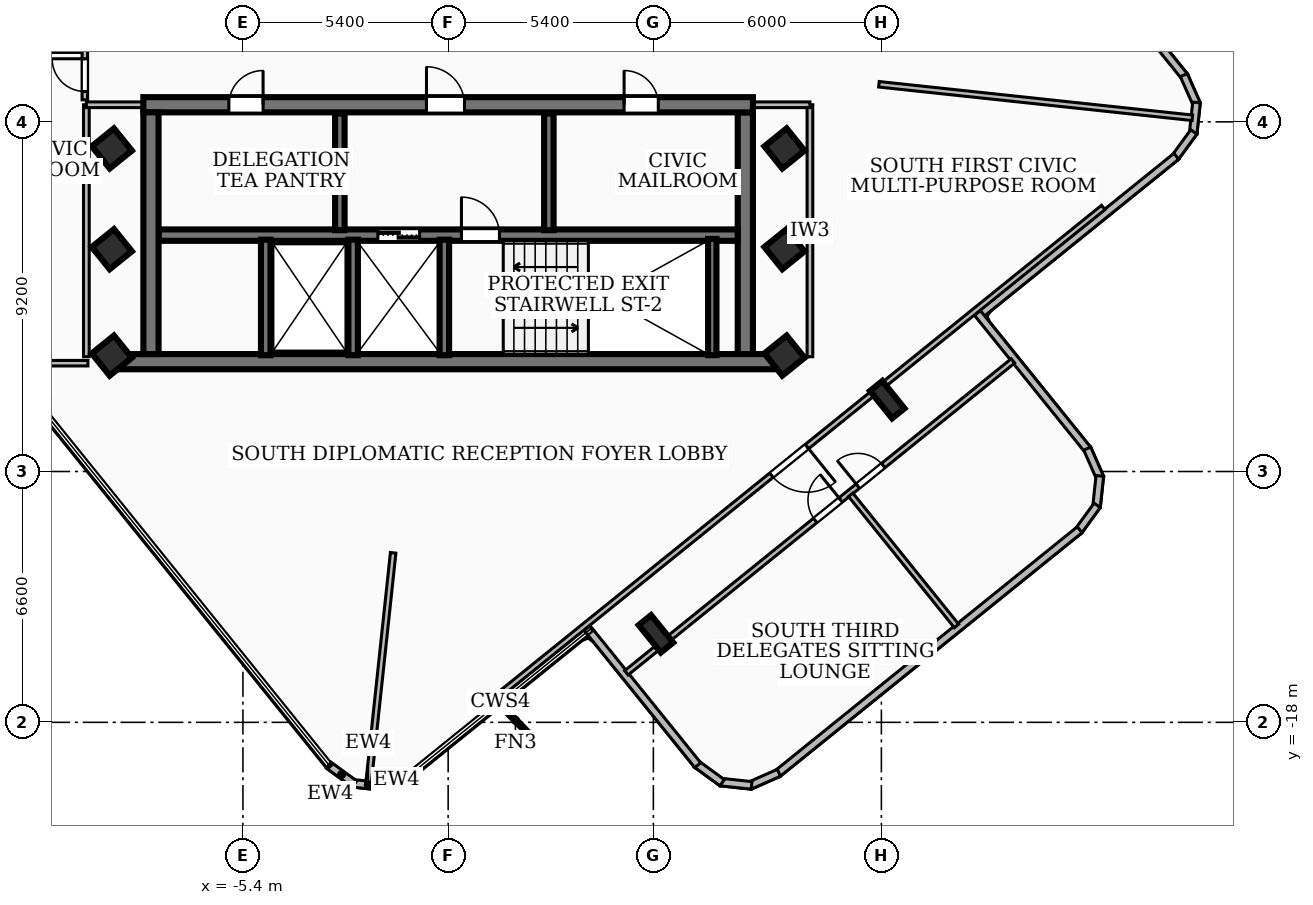
"""IFC4 building model, lengths in metres.
Left out: names, types, materials, properties, quantities, classifications, styles, units other than length and angle.
Written with IfcOpenShell. Run it as: python <this file> out.ifc"""

import sys

from ifc_helpers import new_model, si_unit, direction, frame, frame_2d, origin, origin_2d, place, context, subcontext, project, spatial, rectangle, i_section, extrude, element, fill, save


model = new_model("IFC4")
c1 = context("Model", 3, precision=1e-05, world=origin(), true_north=direction((0.0, 1.0)))
c2 = subcontext(c1, "Body", "Model", "MODEL_VIEW")
j1 = project(units=[si_unit("LENGTHUNIT", "METRE"), si_unit("PLANEANGLEUNIT", "RADIAN")], contexts=[c1])
p1 = place(None, origin())
s1 = spatial("IfcSite", under=j1, at=p1, CompositionType="ELEMENT")
p2 = place(p1, origin())
s2 = spatial("IfcBuilding", under=s1, at=p2, CompositionType="ELEMENT")
p3 = place(p2, frame((0.0, 0.0, 235.98)))
s3 = spatial("IfcBuildingStorey", under=s2, at=p3, CompositionType="ELEMENT", Elevation=235.98)
p4 = place(p3, frame((8.78, -8.51, 0.0), z_axis=(0.0, 0.0, 1.0), x_axis=(-1.0, 0.0, 0.0)))
e1 = element("IfcWall", 1, at=p4, inside=s3, PredefinedType="SHEAR", context=c2, shape_type="SweptSolid", body=[
    extrude(rectangle(XDim=17.56, YDim=0.4, at=frame_2d((8.78, 0.0))), origin(), (0.0, 0.0, 1.0), 3.02),
])
p5 = place(p3, frame((-8.02, -1.75, 0.0), z_axis=(0.0, 0.0, 1.0), x_axis=(1.0, 0.0, 0.0)))
e2 = element("IfcWall", 2, at=p5, inside=s3, PredefinedType="SHEAR", context=c2, shape_type="SweptSolid", body=[
    extrude(rectangle(XDim=16.04, YDim=0.4, at=frame_2d((8.02, 0.0))), origin(), (0.0, 0.0, 1.0), 3.02),
])
p6 = place(p5, frame((7.45, 0.0, 0.0)))
e3 = element("IfcOpeningElement", 3, at=p6, cuts=e2, PredefinedType="OPENING", context=c2, shape_type="SweptSolid", body=[
    extrude(rectangle(XDim=1.0, YDim=2.1, at=frame_2d((0.5, 1.05))), frame((0.0, 0.21, 0.0), z_axis=(0.0, -1.0, 0.0), x_axis=(1.0, 0.0, 0.0)), (0.0, 0.0, 1.0), 0.42),
])
p7 = place(p5, frame((12.65, 0.0, 0.0)))
e4 = element("IfcOpeningElement", 4, at=p7, cuts=e2, PredefinedType="OPENING", context=c2, shape_type="SweptSolid", body=[
    extrude(rectangle(XDim=0.9, YDim=2.06, at=frame_2d((0.45, 1.03))), frame((0.0, 0.21, 0.0), z_axis=(0.0, -1.0, 0.0), x_axis=(1.0, 0.0, 0.0)), (0.0, 0.0, 1.0), 0.42),
])
p8 = place(p5, frame((2.25, 0.0, 0.0)))
e5 = element("IfcOpeningElement", 5, at=p8, cuts=e2, PredefinedType="OPENING", context=c2, shape_type="SweptSolid", body=[
    extrude(rectangle(XDim=0.9, YDim=2.06, at=frame_2d((0.45, 1.03))), frame((0.0, 0.21, 0.0), z_axis=(0.0, -1.0, 0.0), x_axis=(1.0, 0.0, 0.0)), (0.0, 0.0, 1.0), 0.42),
])
for number, where, z_axis, x_axis in (
    (6, (-7.82, -8.31, 0.0), (0.0, 0.0, 1.0), (0.0, 1.0, 0.0)),
    (7, (7.82, -1.95, 0.0), (0.0, 0.0, 1.0), (0.0, -1.0, 0.0)),
):
    element("IfcWall", number, at=place(p3, frame(where, z_axis=z_axis, x_axis=x_axis)), inside=s3, PredefinedType="SHEAR", context=c2, shape_type="SweptSolid", body=[
        extrude(rectangle(XDim=6.36, YDim=0.4, at=frame_2d((3.18, 0.0))), origin(), (0.0, 0.0, 1.0), 3.02),
    ])
p9 = place(p3, frame((-7.62, -5.18, 0.0), z_axis=(0.0, 0.0, 1.0), x_axis=(1.0, 0.0, 0.0)))
e8 = element("IfcWall", 8, at=p9, inside=s3, PredefinedType="SOLIDWALL", context=c2, shape_type="SweptSolid", body=[
    extrude(rectangle(XDim=15.24, YDim=0.3, at=frame_2d((7.62, 0.0))), origin(), (0.0, 0.0, 1.0), 3.02),
])
p10 = place(p9, frame((5.77, 0.0, 0.0)))
e9 = element("IfcOpeningElement", 9, at=p10, cuts=e8, PredefinedType="OPENING", context=c2, shape_type="SweptSolid", body=[
    extrude(rectangle(XDim=1.1, YDim=2.15, at=frame_2d((0.55, 1.075))), frame((0.0, 0.16, 0.0), z_axis=(0.0, -1.0, 0.0), x_axis=(1.0, 0.0, 0.0)), (0.0, 0.0, 1.0), 0.32),
])
p11 = place(p9, frame((7.97, 0.0, 0.0)))
e10 = element("IfcOpeningElement", 10, at=p11, cuts=e8, PredefinedType="OPENING", context=c2, shape_type="SweptSolid", body=[
    extrude(rectangle(XDim=1.0, YDim=2.1, at=frame_2d((0.5, 1.05))), frame((0.0, 0.16, 0.0), z_axis=(0.0, -1.0, 0.0), x_axis=(1.0, 0.0, 0.0)), (0.0, 0.0, 1.0), 0.32),
])
p12 = place(p3, frame((6.95, -8.34, 0.0), z_axis=(0.0, 0.0, 1.0), x_axis=(0.0, 1.0, 0.0)))
e11 = element("IfcWall", 11, at=p12, inside=s3, PredefinedType="SOLIDWALL", context=c2, shape_type="SweptSolid", body=[
    extrude(rectangle(XDim=3.06, YDim=0.22, at=frame_2d((1.53, 0.0))), origin(), (0.0, 0.0, 1.0), 3.02),
])
for number, where, z_axis, x_axis in (
    (12, (-0.1, -8.34, 0.0), (0.0, 0.0, 1.0), (0.0, 1.0, 0.0)),
    (13, (-2.5, -8.34, 0.0), (0.0, 0.0, 1.0), (0.0, 1.0, 0.0)),
    (14, (-4.8, -8.34, 0.0), (0.0, 0.0, 1.0), (0.0, 1.0, 0.0)),
):
    element("IfcWall", number, at=place(p3, frame(where, z_axis=z_axis, x_axis=x_axis)), inside=s3, PredefinedType="SOLIDWALL", context=c2, shape_type="SweptSolid", body=[
        extrude(rectangle(XDim=3.04, YDim=0.25, at=frame_2d((1.52, 0.0))), origin(), (0.0, 0.0, 1.0), 3.02),
    ])
for number, where, z_axis, x_axis in (
    (15, (-2.85, -5.05, 0.0), (0.0, 0.0, 1.0), (0.0, 1.0, 0.0)),
    (16, (2.65, -5.05, 0.0), (0.0, 0.0, 1.0), (0.0, 1.0, 0.0)),
):
    element("IfcWall", number, at=place(p3, frame(where, z_axis=z_axis, x_axis=x_axis)), inside=s3, PredefinedType="SOLIDWALL", context=c2, shape_type="SweptSolid", body=[
        extrude(rectangle(XDim=3.07, YDim=0.25, at=frame_2d((1.535, 0.0))), origin(), (0.0, 0.0, 1.0), 3.02),
    ])
for number, where, z_axis, x_axis in (
    (17, (-8.85, -5.55, 0.0), (0.0, 0.0, 1.0), (0.778, 0.628, 0.0)),
    (18, (-8.85, -2.9, 0.0), (0.0, 0.0, 1.0), (0.778, 0.628, 0.0)),
    (19, (8.85, -5.55, 0.0), (0.0, 0.0, 1.0), (0.778, 0.628, 0.0)),
    (20, (8.85, -2.9, 0.0), (0.0, 0.0, 1.0), (0.778, 0.628, 0.0)),
    (21, (8.85, -8.35, 0.0), (0.0, 0.0, 1.0), (0.778, 0.628, 0.0)),
    (22, (-8.85, -8.35, 0.0), (0.0, 0.0, 1.0), (0.778, 0.628, 0.0)),
):
    element("IfcColumn", number, at=place(p3, frame(where, z_axis=z_axis, x_axis=x_axis)), inside=s3, PredefinedType="COLUMN", context=c2, shape_type="SweptSolid", body=[
        extrude(rectangle(XDim=0.75, YDim=0.75, at=origin_2d()), origin(), (0.0, 0.0, 1.0), 3.42),
    ])
for number, where, z_axis, x_axis in (
    (23, (5.468, -15.671, 0.0), (0.0, 0.0, 1.0), (0.778, 0.628, 0.0)),
    (24, (11.554, -9.51, 0.0), (0.0, 0.0, 1.0), (0.778, 0.628, 0.0)),
):
    element("IfcColumn", number, at=place(p3, frame(where, z_axis=z_axis, x_axis=x_axis)), inside=s3, PredefinedType="COLUMN", context=c2, shape_type="SweptSolid", body=[
        extrude(i_section(OverallWidth=0.418, OverallDepth=0.927, WebThickness=0.019, FlangeThickness=0.032, at=origin_2d()), origin(), (0.0, 0.0, 1.0), 3.42),
    ])
p13 = place(p3, frame((-0.971, -19.359, 0.0), z_axis=(0.0, 0.0, 1.0), x_axis=(-0.914183108905, -0.405301422885, 0.0)))
e25 = element("IfcWall", 25, at=p13, inside=s3, PredefinedType="SOLIDWALL", context=c2, shape_type="SweptSolid", body=[
    extrude(rectangle(XDim=0.839, YDim=0.2, at=frame_2d((0.419, 0.0))), origin(), (0.0, 0.0, 1.0), 3.02),
])
p14 = place(p3, frame((-1.69, -19.692, 0.0), z_axis=(0.0, 0.0, 1.0), x_axis=(-0.994305793889, 0.10656447925, 0.0)))
e26 = element("IfcWall", 26, at=p14, inside=s3, PredefinedType="SOLIDWALL", context=c2, shape_type="SweptSolid", body=[
    extrude(rectangle(XDim=0.825, YDim=0.2, at=frame_2d((0.412, 0.0))), origin(), (0.0, 0.0, 1.0), 3.02),
])
p15 = place(p3, frame((-2.465, -19.622, 0.0), z_axis=(0.0, 0.0, 1.0), x_axis=(-0.807172403894, 0.590315771763, 0.0)))
e27 = element("IfcWall", 27, at=p15, inside=s3, PredefinedType="SOLIDWALL", context=c2, shape_type="SweptSolid", body=[
    extrude(rectangle(XDim=0.839, YDim=0.2, at=frame_2d((0.419, 0.0))), origin(), (0.0, 0.0, 1.0), 3.02),
])
p16 = place(p3, frame((15.528, 3.766, 0.0), z_axis=(0.0, 0.0, 1.0), x_axis=(0.62803447323, -0.778185518007, 0.0)))
e28 = element("IfcWall", 28, at=p16, inside=s3, PredefinedType="SOLIDWALL", context=c2, shape_type="SweptSolid", body=[
    extrude(rectangle(XDim=6.141, YDim=0.2, at=frame_2d((3.071, 0.0))), origin(), (0.0, 0.0, 1.0), 3.02),
])
p17 = place(p3, frame((19.359, -0.971, 0.0), z_axis=(0.0, 0.0, 1.0), x_axis=(0.405301422885, -0.914183108905, 0.0)))
e29 = element("IfcWall", 29, at=p17, inside=s3, PredefinedType="SOLIDWALL", context=c2, shape_type="SweptSolid", body=[
    extrude(rectangle(XDim=0.839, YDim=0.2, at=frame_2d((0.419, 0.0))), origin(), (0.0, 0.0, 1.0), 3.02),
])
p18 = place(p3, frame((19.692, -1.69, 0.0), z_axis=(0.0, 0.0, 1.0), x_axis=(-0.10656447925, -0.994305793889, 0.0)))
e30 = element("IfcWall", 30, at=p18, inside=s3, PredefinedType="SOLIDWALL", context=c2, shape_type="SweptSolid", body=[
    extrude(rectangle(XDim=0.825, YDim=0.2, at=frame_2d((0.412, 0.0))), origin(), (0.0, 0.0, 1.0), 3.02),
])
p19 = place(p3, frame((19.622, -2.465, 0.0), z_axis=(0.0, 0.0, 1.0), x_axis=(-0.590315771763, -0.807172403894, 0.0)))
e31 = element("IfcWall", 31, at=p19, inside=s3, PredefinedType="SOLIDWALL", context=c2, shape_type="SweptSolid", body=[
    extrude(rectangle(XDim=0.839, YDim=0.2, at=frame_2d((0.419, 0.0))), origin(), (0.0, 0.0, 1.0), 3.02),
])
p20 = place(p3, frame((19.161, -3.106, 0.0), z_axis=(0.0, 0.0, 1.0), x_axis=(-0.778151520732, -0.62807659627, 0.0)))
e32 = element("IfcWall", 32, at=p20, inside=s3, PredefinedType="SOLIDWALL", context=c2, shape_type="SweptSolid", body=[
    extrude(rectangle(XDim=6.741, YDim=0.2, at=frame_2d((3.371, 0.0))), origin(), (0.0, 0.0, 1.0), 3.02),
])
p21 = place(p3, frame((13.927, -7.228, 0.0), z_axis=(0.0, 0.0, 1.0), x_axis=(0.628127692416, -0.778110276259, 0.0)))
e33 = element("IfcWall", 33, at=p21, inside=s3, PredefinedType="SOLIDWALL", context=c2, shape_type="SweptSolid", body=[
    extrude(rectangle(XDim=4.641, YDim=0.2, at=frame_2d((2.32, 0.0))), origin(), (0.0, 0.0, 1.0), 3.02),
])
p22 = place(p3, frame((16.816, -10.797, 0.0), z_axis=(0.0, 0.0, 1.0), x_axis=(0.404435765222, -0.914566406451, 0.0)))
e34 = element("IfcWall", 34, at=p22, inside=s3, PredefinedType="SOLIDWALL", context=c2, shape_type="SweptSolid", body=[
    extrude(rectangle(XDim=0.838, YDim=0.2, at=frame_2d((0.419, 0.0))), origin(), (0.0, 0.0, 1.0), 3.02),
])
p23 = place(p3, frame((17.148, -11.516, 0.0), z_axis=(0.0, 0.0, 1.0), x_axis=(-0.106595853222, -0.994302430891, 0.0)))
e35 = element("IfcWall", 35, at=p23, inside=s3, PredefinedType="SOLIDWALL", context=c2, shape_type="SweptSolid", body=[
    extrude(rectangle(XDim=0.824, YDim=0.2, at=frame_2d((0.412, 0.0))), origin(), (0.0, 0.0, 1.0), 3.02),
])
p24 = place(p3, frame((17.078, -12.291, 0.0), z_axis=(0.0, 0.0, 1.0), x_axis=(-0.589366307287, -0.807865926893, 0.0)))
e36 = element("IfcWall", 36, at=p24, inside=s3, PredefinedType="SOLIDWALL", context=c2, shape_type="SweptSolid", body=[
    extrude(rectangle(XDim=0.838, YDim=0.2, at=frame_2d((0.419, 0.0))), origin(), (0.0, 0.0, 1.0), 3.02),
])
p25 = place(p3, frame((16.618, -12.932, 0.0), z_axis=(0.0, 0.0, 1.0), x_axis=(-0.778166052264, -0.628058592095, 0.0)))
e37 = element("IfcWall", 37, at=p25, inside=s3, PredefinedType="SOLIDWALL", context=c2, shape_type="SweptSolid", body=[
    extrude(rectangle(XDim=10.224, YDim=0.2, at=frame_2d((5.112, 0.0))), origin(), (0.0, 0.0, 1.0), 3.02),
])
p26 = place(p3, frame((8.704, -19.327, 0.0), z_axis=(0.0, 0.0, 1.0), x_axis=(-0.914614013687, -0.404328091983, 0.0)))
e38 = element("IfcWall", 38, at=p26, inside=s3, PredefinedType="SOLIDWALL", context=c2, shape_type="SweptSolid", body=[
    extrude(rectangle(XDim=0.839, YDim=0.2, at=frame_2d((0.419, 0.0))), origin(), (0.0, 0.0, 1.0), 3.02),
])
p27 = place(p3, frame((7.985, -19.659, 0.0), z_axis=(0.0, 0.0, 1.0), x_axis=(-0.994305793889, 0.10656447925, 0.0)))
e39 = element("IfcWall", 39, at=p27, inside=s3, PredefinedType="SOLIDWALL", context=c2, shape_type="SweptSolid", body=[
    extrude(rectangle(XDim=0.825, YDim=0.2, at=frame_2d((0.412, 0.0))), origin(), (0.0, 0.0, 1.0), 3.02),
])
p28 = place(p3, frame((7.21, -19.589, 0.0), z_axis=(0.0, 0.0, 1.0), x_axis=(-0.807172403894, 0.590315771763, 0.0)))
e40 = element("IfcWall", 40, at=p28, inside=s3, PredefinedType="SOLIDWALL", context=c2, shape_type="SweptSolid", body=[
    extrude(rectangle(XDim=0.839, YDim=0.2, at=frame_2d((0.419, 0.0))), origin(), (0.0, 0.0, 1.0), 3.02),
])
p29 = place(p3, frame((6.569, -19.128, 0.0), z_axis=(0.0, 0.0, 1.0), x_axis=(-0.628050563363, 0.778172532193, 0.0)))
e41 = element("IfcWall", 41, at=p29, inside=s3, PredefinedType="SOLIDWALL", context=c2, shape_type="SweptSolid", body=[
    extrude(rectangle(XDim=4.641, YDim=0.2, at=frame_2d((2.321, 0.0))), origin(), (0.0, 0.0, 1.0), 3.02),
])
p30 = place(p3, frame((-9.52, -8.38, 0.0), z_axis=(0.0, 0.0, 1.0), x_axis=(0.0, 1.0, 0.0)))
e42 = element("IfcWall", 42, at=p30, inside=s3, PredefinedType="PARTITIONING", context=c2, shape_type="SweptSolid", body=[
    extrude(rectangle(XDim=6.63, YDim=0.15, at=frame_2d((3.315, 0.0))), origin(), (0.0, 0.0, 1.0), 1.904),
])
p31 = place(p3, frame((-7.85, -1.75, 0.0), z_axis=(0.0, 0.0, 1.0), x_axis=(-1.0, 0.0, 0.0)))
e43 = element("IfcWall", 43, at=p31, inside=s3, PredefinedType="PARTITIONING", context=c2, shape_type="SweptSolid", body=[
    extrude(rectangle(XDim=1.67, YDim=0.15, at=frame_2d((0.835, 0.0))), origin(), (0.0, 0.0, 1.0), 1.15),
])
p32 = place(p3, frame((9.52, -8.38, 0.0), z_axis=(0.0, 0.0, 1.0), x_axis=(0.0, 1.0, 0.0)))
e44 = element("IfcWall", 44, at=p32, inside=s3, PredefinedType="PARTITIONING", context=c2, shape_type="SweptSolid", body=[
    extrude(rectangle(XDim=6.63, YDim=0.15, at=frame_2d((3.315, 0.0))), origin(), (0.0, 0.0, 1.0), 3.02),
])
p33 = place(p3, frame((7.85, -1.75, 0.0), z_axis=(0.0, 0.0, 1.0), x_axis=(1.0, 0.0, 0.0)))
e45 = element("IfcWall", 45, at=p33, inside=s3, PredefinedType="PARTITIONING", context=c2, shape_type="SweptSolid", body=[
    extrude(rectangle(XDim=1.67, YDim=0.15, at=frame_2d((0.835, 0.0))), origin(), (0.0, 0.0, 1.0), 2.25),
])
p34 = place(p3, frame((-18.242, -0.3, 0.0), z_axis=(0.0, 0.0, 1.0), x_axis=(1.0, 0.0, 0.0)))
e46 = element("IfcWall", 46, at=p34, inside=s3, PredefinedType="PARTITIONING", context=c2, shape_type="SweptSolid", body=[
    extrude(rectangle(XDim=8.582, YDim=0.145, at=frame_2d((4.291, 0.0))), origin(), (0.0, 0.0, 1.0), 1.15),
])
p35 = place(p3, frame((-11.585, -8.55, 0.0), z_axis=(0.0, 0.0, 1.0), x_axis=(1.0, 0.0, 0.0)))
e47 = element("IfcWall", 47, at=p35, inside=s3, PredefinedType="PARTITIONING", context=c2, shape_type="SweptSolid", body=[
    extrude(rectangle(XDim=2.105, YDim=0.145, at=frame_2d((1.052, 0.0))), origin(), (0.0, 0.0, 1.0), 3.02),
])
p36 = place(p3, frame((-9.56, -1.62, 0.0), z_axis=(0.0, 0.0, 1.0), x_axis=(0.0, 1.0, 0.0)))
e48 = element("IfcWall", 48, at=p36, inside=s3, PredefinedType="PARTITIONING", context=c2, shape_type="SweptSolid", body=[
    extrude(rectangle(XDim=3.24, YDim=0.145, at=frame_2d((1.62, 0.0))), origin(), (0.0, 0.0, 1.0), 3.02),
])
p37 = place(p36, frame((0.22, 0.0, 0.0)))
e49 = element("IfcOpeningElement", 49, at=p37, cuts=e48, PredefinedType="OPENING", context=c2, shape_type="SweptSolid", body=[
    extrude(rectangle(XDim=0.86, YDim=2.04, at=frame_2d((0.43, 1.02))), frame((0.0, 0.083, 0.0), z_axis=(0.0, -1.0, 0.0), x_axis=(1.0, 0.0, 0.0)), (0.0, 0.0, 1.0), 0.165),
])
p38 = place(p36, frame((2.16, 0.0, 0.0)))
e50 = element("IfcOpeningElement", 50, at=p38, cuts=e48, PredefinedType="OPENING", context=c2, shape_type="SweptSolid", body=[
    extrude(rectangle(XDim=0.86, YDim=2.04, at=frame_2d((0.43, 1.02))), frame((0.0, 0.083, 0.0), z_axis=(0.0, -1.0, 0.0), x_axis=(1.0, 0.0, 0.0)), (0.0, 0.0, 1.0), 0.165),
])
p39 = place(p3, frame((-1.447, -13.54, 0.0), z_axis=(0.0, 0.0, 1.0), x_axis=(-0.106294824765, -0.994334657059, 0.0)))
e51 = element("IfcWall", 51, at=p39, inside=s3, PredefinedType="PARTITIONING", context=c2, shape_type="SweptSolid", body=[
    extrude(rectangle(XDim=6.077, YDim=0.145, at=frame_2d((3.039, 0.0))), origin(), (0.0, 0.0, 1.0), 3.02),
])
p40 = place(p3, frame((11.335, -1.211, 0.0), z_axis=(0.0, 0.0, 1.0), x_axis=(0.994330067434, -0.106337749634, 0.0)))
e52 = element("IfcWall", 52, at=p40, inside=s3, PredefinedType="PARTITIONING", context=c2, shape_type="SweptSolid", body=[
    extrude(rectangle(XDim=8.295, YDim=0.145, at=frame_2d((4.147, 0.0))), origin(), (0.0, 0.0, 1.0), 3.02),
])
p41 = place(p3, frame((17.239, -4.452, 0.0), z_axis=(0.0, 0.0, 1.0), x_axis=(-0.778262183237, -0.627939466942, 0.0)))
e53 = element("IfcWall", 53, at=p41, inside=s3, PredefinedType="PARTITIONING", context=c2, shape_type="SweptSolid", body=[
    extrude(rectangle(XDim=20.641, YDim=0.145, at=frame_2d((10.32, 0.0))), origin(), (0.0, 0.0, 1.0), 2.39),
])
p42 = place(p41, frame((10.02, 0.0, 0.0)))
e54 = element("IfcOpeningElement", 54, at=p42, cuts=e53, PredefinedType="OPENING", context=c2, shape_type="SweptSolid", body=[
    extrude(rectangle(XDim=1.2, YDim=2.1, at=frame_2d((0.6, 1.05))), frame((0.0, 0.083, 0.0), z_axis=(0.0, -1.0, 0.0), x_axis=(1.0, 0.0, 0.0)), (0.0, 0.0, 1.0), 0.165),
])
p43 = place(p3, frame((10.592, -12.012, 0.0), z_axis=(0.0, 0.0, 1.0), x_axis=(0.627878320572, -0.778311515112, 0.0)))
e55 = element("IfcWall", 55, at=p43, inside=s3, PredefinedType="PARTITIONING", context=c2, shape_type="SweptSolid", body=[
    extrude(rectangle(XDim=4.436, YDim=0.145, at=frame_2d((2.218, 0.0))), origin(), (0.0, 0.0, 1.0), 3.02),
])
p44 = place(p3, frame((4.69, -16.697, 0.0), z_axis=(0.0, 0.0, 1.0), x_axis=(0.778274338812, 0.62792440114, 0.0)))
e56 = element("IfcWall", 56, at=p44, inside=s3, PredefinedType="PARTITIONING", context=c2, shape_type="SweptSolid", body=[
    extrude(rectangle(XDim=13.07, YDim=0.145, at=frame_2d((6.535, 0.0))), origin(), (0.0, 0.0, 1.0), 3.02),
])
p45 = place(p44, frame((6.385, 0.0, 0.0)))
e57 = element("IfcOpeningElement", 57, at=p45, cuts=e56, PredefinedType="OPENING", context=c2, shape_type="SweptSolid", body=[
    extrude(rectangle(XDim=0.86, YDim=2.04, at=frame_2d((0.43, 1.02))), frame((0.0, 0.083, 0.0), z_axis=(0.0, -1.0, 0.0), x_axis=(1.0, 0.0, 0.0)), (0.0, 0.0, 1.0), 0.165),
])
p46 = place(p44, frame((7.825, 0.0, 0.0)))
e58 = element("IfcOpeningElement", 58, at=p46, cuts=e56, PredefinedType="OPENING", context=c2, shape_type="SweptSolid", body=[
    extrude(rectangle(XDim=0.86, YDim=2.04, at=frame_2d((0.43, 1.02))), frame((0.0, 0.083, 0.0), z_axis=(0.0, -1.0, 0.0), x_axis=(1.0, 0.0, 0.0)), (0.0, 0.0, 1.0), 0.165),
])
p47 = place(p6, origin())
e59 = element("IfcDoor", 59, at=p47, inside=s3, OperationType="SINGLE_SWING_LEFT", PredefinedType="DOOR", context=c2, shape_type="SweptSolid", body=[
    extrude(rectangle(XDim=1.0, YDim=2.1, at=frame_2d((0.5, 1.05))), frame((0.0, 0.025, 0.0), z_axis=(0.0, -1.0, 0.0), x_axis=(1.0, 0.0, 0.0)), (0.0, 0.0, 1.0), 0.05),
])
fill(e3, e59)
p48 = place(p10, origin())
e60 = element("IfcDoor", 60, at=p48, inside=s3, OperationType="DOUBLE_DOOR_SLIDING", PredefinedType="DOOR", context=c2, shape_type="SweptSolid", body=[
    extrude(rectangle(XDim=1.1, YDim=2.15, at=frame_2d((0.55, 1.075))), frame((0.0, 0.025, 0.0), z_axis=(0.0, -1.0, 0.0), x_axis=(1.0, 0.0, 0.0)), (0.0, 0.0, 1.0), 0.05),
])
fill(e9, e60)
p49 = place(p11, origin())
e61 = element("IfcDoor", 61, at=p49, inside=s3, OperationType="SINGLE_SWING_LEFT", PredefinedType="DOOR", context=c2, shape_type="SweptSolid", body=[
    extrude(rectangle(XDim=1.0, YDim=2.1, at=frame_2d((0.5, 1.05))), frame((0.0, 0.025, 0.0), z_axis=(0.0, -1.0, 0.0), x_axis=(1.0, 0.0, 0.0)), (0.0, 0.0, 1.0), 0.05),
])
fill(e10, e61)
p50 = place(p7, origin())
e62 = element("IfcDoor", 62, at=p50, inside=s3, OperationType="SINGLE_SWING_LEFT", PredefinedType="DOOR", context=c2, shape_type="SweptSolid", body=[
    extrude(rectangle(XDim=0.9, YDim=2.06, at=frame_2d((0.45, 1.03))), frame((0.0, 0.025, 0.0), z_axis=(0.0, -1.0, 0.0), x_axis=(1.0, 0.0, 0.0)), (0.0, 0.0, 1.0), 0.05),
])
fill(e4, e62)
p51 = place(p8, origin())
e63 = element("IfcDoor", 63, at=p51, inside=s3, OperationType="SINGLE_SWING_RIGHT", PredefinedType="DOOR", context=c2, shape_type="SweptSolid", body=[
    extrude(rectangle(XDim=0.9, YDim=2.06, at=frame_2d((0.45, 1.03))), frame((0.0, 0.025, 0.0), z_axis=(0.0, -1.0, 0.0), x_axis=(1.0, 0.0, 0.0)), (0.0, 0.0, 1.0), 0.05),
])
fill(e5, e63)
p52 = place(p37, origin())
e64 = element("IfcDoor", 64, at=p52, inside=s3, OperationType="SINGLE_SWING_RIGHT", PredefinedType="DOOR", context=c2, shape_type="SweptSolid", body=[
    extrude(rectangle(XDim=0.86, YDim=2.04, at=frame_2d((0.43, 1.02))), frame((0.0, 0.025, 0.0), z_axis=(0.0, -1.0, 0.0), x_axis=(1.0, 0.0, 0.0)), (0.0, 0.0, 1.0), 0.05),
])
fill(e49, e64)
p53 = place(p42, origin())
e65 = element("IfcDoor", 65, at=p53, inside=s3, OperationType="SINGLE_SWING_LEFT", PredefinedType="DOOR", context=c2, shape_type="SweptSolid", body=[
    extrude(rectangle(XDim=1.2, YDim=2.1, at=frame_2d((0.6, 1.05))), frame((0.0, 0.025, 0.0), z_axis=(0.0, -1.0, 0.0), x_axis=(1.0, 0.0, 0.0)), (0.0, 0.0, 1.0), 0.05),
])
fill(e54, e65)
p54 = place(p45, origin())
e66 = element("IfcDoor", 66, at=p54, inside=s3, OperationType="SINGLE_SWING_RIGHT", PredefinedType="DOOR", context=c2, shape_type="SweptSolid", body=[
    extrude(rectangle(XDim=0.86, YDim=2.04, at=frame_2d((0.43, 1.02))), frame((0.0, 0.025, 0.0), z_axis=(0.0, -1.0, 0.0), x_axis=(1.0, 0.0, 0.0)), (0.0, 0.0, 1.0), 0.05),
])
fill(e57, e66)
p55 = place(p46, origin())
e67 = element("IfcDoor", 67, at=p55, inside=s3, OperationType="SINGLE_SWING_LEFT", PredefinedType="DOOR", context=c2, shape_type="SweptSolid", body=[
    extrude(rectangle(XDim=0.86, YDim=2.04, at=frame_2d((0.43, 1.02))), frame((0.0, 0.025, 0.0), z_axis=(0.0, -1.0, 0.0), x_axis=(1.0, 0.0, 0.0)), (0.0, 0.0, 1.0), 0.05),
])
fill(e58, e67)
save(model, sys.argv[1])
